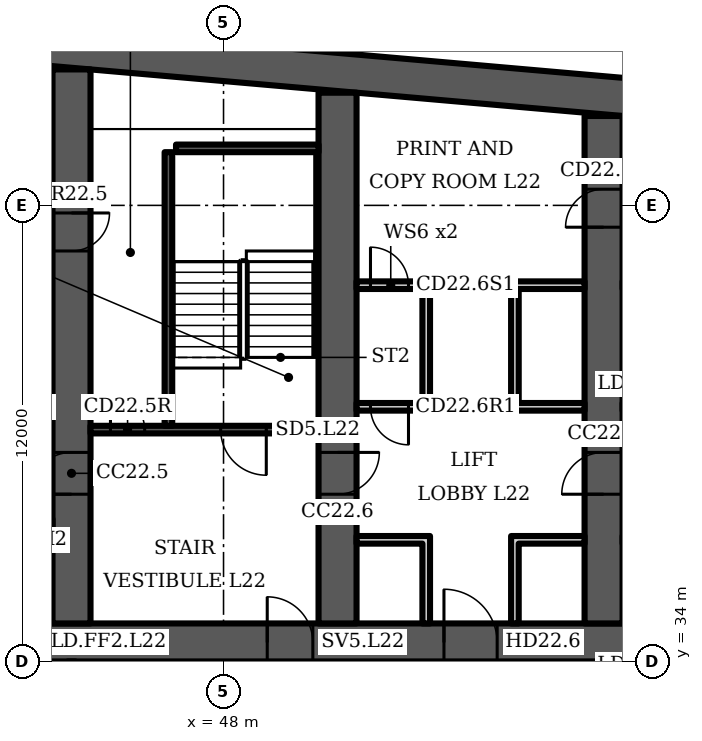
"""IFC4 building model, lengths in metres.
Left out: names, types, materials, properties, quantities, classifications, styles, units other than length and angle.
Written with IfcOpenShell. Run it as: python <this file> out.ifc"""

import sys

from ifc_helpers import new_model, si_unit, direction, frame, frame_2d, origin, place, context, subcontext, project, spatial, polyline, rectangle, outline, extrude, element, fill, save


model = new_model("IFC4")
c1 = context("Model", 3, precision=1e-05, world=origin(), true_north=direction((0.0, 1.0)))
c2 = subcontext(c1, "Body", "Model", "MODEL_VIEW")
j1 = project(units=[si_unit("LENGTHUNIT", "METRE"), si_unit("PLANEANGLEUNIT", "RADIAN")], contexts=[c1])
p1 = place(None, origin())
s1 = spatial("IfcSite", under=j1, at=p1, CompositionType="ELEMENT")
p2 = place(p1, origin())
s2 = spatial("IfcBuilding", under=s1, at=p2, CompositionType="ELEMENT")
p3 = place(p2, frame((0.0, 0.0, 100.3)))
s3 = spatial("IfcBuildingStorey", under=s2, at=p3, CompositionType="ELEMENT", Elevation=100.3)
p4 = place(p3, frame((0.0, 0.0, -0.0)))
e1 = element("IfcWall", 1, at=p4, inside=s3, PredefinedType="SHEAR", context=c2, shape_type="SweptSolid", body=[
    extrude(outline(polyline([(16.0, 47.784), (40.5, 49.927), (65.0, 47.784), (65.0, 48.787), (40.5, 50.931), (16.0, 48.787), (16.0, 47.784)])), origin(), (0.0, 0.0, 1.0), 3.6),
])
p5 = place(p3, frame((16.0, 34.5, 0.0), z_axis=(0.0, 0.0, 1.0), x_axis=(1.0, 0.0, 0.0)))
e2 = element("IfcWall", 2, at=p5, inside=s3, PredefinedType="SHEAR", context=c2, shape_type="SweptSolid", body=[
    extrude(rectangle(XDim=49.0, YDim=1.0, at=frame_2d((24.5, 0.0))), origin(), (0.0, 0.0, 1.0), 3.6),
])
p6 = place(p5, frame((1.2, 0.0, 0.0)))
e3 = element("IfcOpeningElement", 3, at=p6, cuts=e2, PredefinedType="OPENING", context=c2, shape_type="SweptSolid", body=[
    extrude(rectangle(XDim=1.1, YDim=2.1, at=frame_2d((0.55, 1.05))), frame((0.0, 0.51, 0.0), z_axis=(0.0, -1.0, 0.0), x_axis=(1.0, 0.0, 0.0)), (0.0, 0.0, 1.0), 1.02),
])
p7 = place(p5, frame((5.083, 0.0, 0.0)))
e4 = element("IfcOpeningElement", 4, at=p7, cuts=e2, PredefinedType="OPENING", context=c2, shape_type="SweptSolid", body=[
    extrude(rectangle(XDim=1.1, YDim=2.1, at=frame_2d((0.55, 1.05))), frame((0.0, 0.51, 0.0), z_axis=(0.0, -1.0, 0.0), x_axis=(1.0, 0.0, 0.0)), (0.0, 0.0, 1.0), 1.02),
])
p8 = place(p5, frame((2.933, 0.0, 0.0)))
e5 = element("IfcOpeningElement", 5, at=p8, cuts=e2, PredefinedType="OPENING", context=c2, shape_type="SweptSolid", body=[
    extrude(rectangle(XDim=1.4, YDim=2.1, at=frame_2d((0.7, 1.05))), frame((0.0, 0.51, 0.0), z_axis=(0.0, -1.0, 0.0), x_axis=(1.0, 0.0, 0.0)), (0.0, 0.0, 1.0), 1.02),
])
p9 = place(p5, frame((7.65, 0.0, 0.0)))
e6 = element("IfcOpeningElement", 6, at=p9, cuts=e2, PredefinedType="OPENING", context=c2, shape_type="SweptSolid", body=[
    extrude(rectangle(XDim=1.2, YDim=2.1, at=frame_2d((0.6, 1.05))), frame((0.0, 0.51, 0.0), z_axis=(0.0, -1.0, 0.0), x_axis=(1.0, 0.0, 0.0)), (0.0, 0.0, 1.0), 1.02),
])
p10 = place(p5, frame((14.817, 0.0, 0.0)))
e7 = element("IfcOpeningElement", 7, at=p10, cuts=e2, PredefinedType="OPENING", context=c2, shape_type="SweptSolid", body=[
    extrude(rectangle(XDim=1.1, YDim=2.1, at=frame_2d((0.55, 1.05))), frame((0.0, 0.51, 0.0), z_axis=(0.0, -1.0, 0.0), x_axis=(1.0, 0.0, 0.0)), (0.0, 0.0, 1.0), 1.02),
])
p11 = place(p5, frame((19.083, 0.0, 0.0)))
e8 = element("IfcOpeningElement", 8, at=p11, cuts=e2, PredefinedType="OPENING", context=c2, shape_type="SweptSolid", body=[
    extrude(rectangle(XDim=1.1, YDim=2.1, at=frame_2d((0.55, 1.05))), frame((0.0, 0.51, 0.0), z_axis=(0.0, -1.0, 0.0), x_axis=(1.0, 0.0, 0.0)), (0.0, 0.0, 1.0), 1.02),
])
p12 = place(p5, frame((16.8, 0.0, 0.0)))
e9 = element("IfcOpeningElement", 9, at=p12, cuts=e2, PredefinedType="OPENING", context=c2, shape_type="SweptSolid", body=[
    extrude(rectangle(XDim=1.4, YDim=2.1, at=frame_2d((0.7, 1.05))), frame((0.0, 0.51, 0.0), z_axis=(0.0, -1.0, 0.0), x_axis=(1.0, 0.0, 0.0)), (0.0, 0.0, 1.0), 1.02),
])
p13 = place(p5, frame((21.817, 0.0, 0.0)))
e10 = element("IfcOpeningElement", 10, at=p13, cuts=e2, PredefinedType="OPENING", context=c2, shape_type="SweptSolid", body=[
    extrude(rectangle(XDim=1.1, YDim=2.1, at=frame_2d((0.55, 1.05))), frame((0.0, 0.51, 0.0), z_axis=(0.0, -1.0, 0.0), x_axis=(1.0, 0.0, 0.0)), (0.0, 0.0, 1.0), 1.02),
])
p14 = place(p5, frame((26.083, 0.0, 0.0)))
e11 = element("IfcOpeningElement", 11, at=p14, cuts=e2, PredefinedType="OPENING", context=c2, shape_type="SweptSolid", body=[
    extrude(rectangle(XDim=1.1, YDim=2.1, at=frame_2d((0.55, 1.05))), frame((0.0, 0.51, 0.0), z_axis=(0.0, -1.0, 0.0), x_axis=(1.0, 0.0, 0.0)), (0.0, 0.0, 1.0), 1.02),
])
p15 = place(p5, frame((33.15, 0.0, 0.0)))
e12 = element("IfcOpeningElement", 12, at=p15, cuts=e2, PredefinedType="OPENING", context=c2, shape_type="SweptSolid", body=[
    extrude(rectangle(XDim=1.2, YDim=2.1, at=frame_2d((0.6, 1.05))), frame((0.0, 0.51, 0.0), z_axis=(0.0, -1.0, 0.0), x_axis=(1.0, 0.0, 0.0)), (0.0, 0.0, 1.0), 1.02),
])
p16 = place(p5, frame((37.8, 0.0, 0.0)))
e13 = element("IfcOpeningElement", 13, at=p16, cuts=e2, PredefinedType="OPENING", context=c2, shape_type="SweptSolid", body=[
    extrude(rectangle(XDim=1.4, YDim=2.1, at=frame_2d((0.7, 1.05))), frame((0.0, 0.51, 0.0), z_axis=(0.0, -1.0, 0.0), x_axis=(1.0, 0.0, 0.0)), (0.0, 0.0, 1.0), 1.02),
])
p17 = place(p5, frame((42.817, 0.0, 0.0)))
e14 = element("IfcOpeningElement", 14, at=p17, cuts=e2, PredefinedType="OPENING", context=c2, shape_type="SweptSolid", body=[
    extrude(rectangle(XDim=1.1, YDim=2.1, at=frame_2d((0.55, 1.05))), frame((0.0, 0.51, 0.0), z_axis=(0.0, -1.0, 0.0), x_axis=(1.0, 0.0, 0.0)), (0.0, 0.0, 1.0), 1.02),
])
p18 = place(p5, frame((46.7, 0.0, 0.0)))
e15 = element("IfcOpeningElement", 15, at=p18, cuts=e2, PredefinedType="OPENING", context=c2, shape_type="SweptSolid", body=[
    extrude(rectangle(XDim=1.1, YDim=2.1, at=frame_2d((0.55, 1.05))), frame((0.0, 0.51, 0.0), z_axis=(0.0, -1.0, 0.0), x_axis=(1.0, 0.0, 0.0)), (0.0, 0.0, 1.0), 1.02),
])
p19 = place(p5, frame((44.667, 0.0, 0.0)))
e16 = element("IfcOpeningElement", 16, at=p19, cuts=e2, PredefinedType="OPENING", context=c2, shape_type="SweptSolid", body=[
    extrude(rectangle(XDim=1.4, YDim=2.1, at=frame_2d((0.7, 1.05))), frame((0.0, 0.51, 0.0), z_axis=(0.0, -1.0, 0.0), x_axis=(1.0, 0.0, 0.0)), (0.0, 0.0, 1.0), 1.02),
])
p20 = place(p3, frame((44.0, 35.0, 0.0), z_axis=(0.0, 0.0, 1.0), x_axis=(0.0, 1.0, 0.0)))
e17 = element("IfcWall", 17, at=p20, inside=s3, PredefinedType="SHEAR", context=c2, shape_type="SweptSolid", body=[
    extrude(rectangle(XDim=14.577, YDim=1.0, at=frame_2d((7.289, 0.0))), origin(), (0.0, 0.0, 1.0), 3.6),
])
p21 = place(p20, frame((3.4, 0.0, 0.0)))
e18 = element("IfcOpeningElement", 18, at=p21, cuts=e17, PredefinedType="OPENING", context=c2, shape_type="SweptSolid", body=[
    extrude(rectangle(XDim=1.1, YDim=2.1, at=frame_2d((0.55, 1.05))), frame((0.0, 0.51, 0.0), z_axis=(0.0, -1.0, 0.0), x_axis=(1.0, 0.0, 0.0)), (0.0, 0.0, 1.0), 1.02),
])
p22 = place(p20, frame((9.8, 0.0, 0.0)))
e19 = element("IfcOpeningElement", 19, at=p22, cuts=e17, PredefinedType="OPENING", context=c2, shape_type="SweptSolid", body=[
    extrude(rectangle(XDim=1.0, YDim=2.1, at=frame_2d((0.5, 1.05))), frame((0.0, 0.51, 0.0), z_axis=(0.0, -1.0, 0.0), x_axis=(1.0, 0.0, 0.0)), (0.0, 0.0, 1.0), 1.02),
])
p23 = place(p3, frame((51.0, 35.0, 0.0), z_axis=(0.0, 0.0, 1.0), x_axis=(0.0, 1.0, 0.0)))
e20 = element("IfcWall", 20, at=p23, inside=s3, PredefinedType="SHEAR", context=c2, shape_type="SweptSolid", body=[
    extrude(rectangle(XDim=13.965, YDim=1.0, at=frame_2d((6.982, 0.0))), origin(), (0.0, 0.0, 1.0), 3.6),
])
p24 = place(p23, frame((3.4, 0.0, 0.0)))
e21 = element("IfcOpeningElement", 21, at=p24, cuts=e20, PredefinedType="OPENING", context=c2, shape_type="SweptSolid", body=[
    extrude(rectangle(XDim=1.1, YDim=2.1, at=frame_2d((0.55, 1.05))), frame((0.0, 0.51, 0.0), z_axis=(0.0, -1.0, 0.0), x_axis=(1.0, 0.0, 0.0)), (0.0, 0.0, 1.0), 1.02),
])
p25 = place(p3, frame((58.0, 35.0, 0.0), z_axis=(0.0, 0.0, 1.0), x_axis=(0.0, 1.0, 0.0)))
e22 = element("IfcWall", 22, at=p25, inside=s3, PredefinedType="SHEAR", context=c2, shape_type="SweptSolid", body=[
    extrude(rectangle(XDim=13.352, YDim=1.0, at=frame_2d((6.676, 0.0))), origin(), (0.0, 0.0, 1.0), 3.6),
])
p26 = place(p25, frame((10.426, 0.0, 0.0)))
e23 = element("IfcOpeningElement", 23, at=p26, cuts=e22, PredefinedType="OPENING", context=c2, shape_type="SweptSolid", body=[
    extrude(rectangle(XDim=1.0, YDim=2.1, at=frame_2d((0.5, 1.05))), frame((0.0, 0.51, 0.0), z_axis=(0.0, -1.0, 0.0), x_axis=(1.0, 0.0, 0.0)), (0.0, 0.0, 1.0), 1.02),
])
p27 = place(p25, frame((3.4, 0.0, 0.0)))
e24 = element("IfcOpeningElement", 24, at=p27, cuts=e22, PredefinedType="OPENING", context=c2, shape_type="SweptSolid", body=[
    extrude(rectangle(XDim=1.1, YDim=2.1, at=frame_2d((0.55, 1.05))), frame((0.0, 0.51, 0.0), z_axis=(0.0, -1.0, 0.0), x_axis=(1.0, 0.0, 0.0)), (0.0, 0.0, 1.0), 1.02),
])
p28 = place(p3, frame((44.5, 40.1, 0.0), z_axis=(0.0, 0.0, 1.0), x_axis=(1.0, 0.0, 0.0)))
e25 = element("IfcWall", 25, at=p28, inside=s3, PredefinedType="SHEAR", context=c2, shape_type="SweptSolid", body=[
    extrude(rectangle(XDim=6.0, YDim=0.2, at=frame_2d((3.0, 0.0))), origin(), (0.0, 0.0, 1.0), 3.2),
])
p29 = place(p28, frame((3.425, 0.0, 0.0)))
e26 = element("IfcOpeningElement", 26, at=p29, cuts=e25, PredefinedType="OPENING", context=c2, shape_type="SweptSolid", body=[
    extrude(rectangle(XDim=1.2, YDim=2.1, at=frame_2d((0.6, 1.05))), frame((0.0, 0.11, 0.0), z_axis=(0.0, -1.0, 0.0), x_axis=(1.0, 0.0, 0.0)), (0.0, 0.0, 1.0), 0.22),
])
p30 = place(p28, frame((0.525, 0.0, 0.0)))
e27 = element("IfcOpeningElement", 27, at=p30, cuts=e25, PredefinedType="OPENING", context=c2, shape_type="SweptSolid", body=[
    extrude(rectangle(XDim=0.9, YDim=2.1, at=frame_2d((0.45, 1.05))), frame((0.0, 0.11, 0.0), z_axis=(0.0, -1.0, 0.0), x_axis=(1.0, 0.0, 0.0)), (0.0, 0.0, 1.0), 0.22),
])
p31 = place(p3, frame((46.55, 40.2, 0.0), z_axis=(0.0, 0.0, 1.0), x_axis=(0.0, 1.0, 0.0)))
e28 = element("IfcWall", 28, at=p31, inside=s3, PredefinedType="SHEAR", context=c2, shape_type="SweptSolid", body=[
    extrude(rectangle(XDim=7.2, YDim=0.2, at=frame_2d((3.6, 0.0))), origin(), (0.0, 0.0, 1.0), 3.2),
])
p32 = place(p3, frame((46.75, 47.5, 0.0), z_axis=(0.0, 0.0, 1.0), x_axis=(1.0, 0.0, 0.0)))
e29 = element("IfcWall", 29, at=p32, inside=s3, PredefinedType="SHEAR", context=c2, shape_type="SweptSolid", body=[
    extrude(rectangle(XDim=3.75, YDim=0.2, at=frame_2d((1.875, 0.0))), origin(), (0.0, 0.0, 1.0), 3.2),
])
p33 = place(p3, frame((51.5, 40.7, 0.0), z_axis=(0.0, 0.0, 1.0), x_axis=(1.0, 0.0, 0.0)))
e30 = element("IfcWall", 30, at=p33, inside=s3, PredefinedType="PARTITIONING", context=c2, shape_type="SweptSolid", body=[
    extrude(rectangle(XDim=6.0, YDim=0.2, at=frame_2d((3.0, 0.0))), origin(), (0.0, 0.0, 1.0), 3.2),
])
p34 = place(p33, frame((0.367, 0.0, 0.0)))
e31 = element("IfcOpeningElement", 31, at=p34, cuts=e30, PredefinedType="OPENING", context=c2, shape_type="SweptSolid", body=[
    extrude(rectangle(XDim=1.0, YDim=2.1, at=frame_2d((0.5, 1.05))), frame((0.0, 0.11, 0.0), z_axis=(0.0, -1.0, 0.0), x_axis=(1.0, 0.0, 0.0)), (0.0, 0.0, 1.0), 0.22),
])
p35 = place(p3, frame((51.5, 43.9, 0.0), z_axis=(0.0, 0.0, 1.0), x_axis=(1.0, 0.0, 0.0)))
e32 = element("IfcWall", 32, at=p35, inside=s3, PredefinedType="PARTITIONING", context=c2, shape_type="SweptSolid", body=[
    extrude(rectangle(XDim=6.0, YDim=0.2, at=frame_2d((3.0, 0.0))), origin(), (0.0, 0.0, 1.0), 3.2),
])
p36 = place(p35, frame((0.367, 0.0, 0.0)))
e33 = element("IfcOpeningElement", 33, at=p36, cuts=e32, PredefinedType="OPENING", context=c2, shape_type="SweptSolid", body=[
    extrude(rectangle(XDim=1.0, YDim=2.1, at=frame_2d((0.5, 1.05))), frame((0.0, 0.11, 0.0), z_axis=(0.0, -1.0, 0.0), x_axis=(1.0, 0.0, 0.0)), (0.0, 0.0, 1.0), 0.22),
])
p37 = place(p3, frame((0.0, 0.0, -0.0)))
e34 = element("IfcWall", 34, at=p37, inside=s3, PredefinedType="PARTITIONING", context=c2, shape_type="SweptSolid", body=[
    extrude(outline(polyline([(53.233, 37.1), (51.5, 37.1), (51.5, 37.3), (53.233, 37.3), (53.433, 37.3), (53.433, 35.0), (53.233, 35.0), (53.233, 37.1)])), origin(), (0.0, 0.0, 1.0), 3.2),
])
p38 = place(p3, frame((0.0, 0.0, -0.0)))
e35 = element("IfcWall", 35, at=p38, inside=s3, PredefinedType="PARTITIONING", context=c2, shape_type="SweptSolid", body=[
    extrude(outline(polyline([(55.567, 37.3), (55.767, 37.3), (57.5, 37.3), (57.5, 37.1), (55.767, 37.1), (55.767, 35.0), (55.567, 35.0), (55.567, 37.3)])), origin(), (0.0, 0.0, 1.0), 3.2),
])
p39 = place(p3, frame((0.0, 0.0, -0.0)))
e36 = element("IfcWall", 36, at=p39, inside=s3, PredefinedType="PARTITIONING", context=c2, shape_type="SweptSolid", body=[
    extrude(outline(polyline([(53.233, 40.8), (53.233, 43.8), (53.433, 43.8), (53.433, 40.8), (53.233, 40.8)])), origin(), (0.0, 0.0, 1.0), 3.2),
])
p40 = place(p3, frame((0.0, 0.0, -0.0)))
e37 = element("IfcWall", 37, at=p40, inside=s3, PredefinedType="PARTITIONING", context=c2, shape_type="SweptSolid", body=[
    extrude(outline(polyline([(55.567, 40.8), (55.567, 43.8), (55.767, 43.8), (55.767, 40.8), (55.567, 40.8)])), origin(), (0.0, 0.0, 1.0), 3.2),
])
p41 = place(p29, origin())
e38 = element("IfcDoor", 38, at=p41, inside=s3, OperationType="SINGLE_SWING_RIGHT", PredefinedType="DOOR", context=c2, shape_type="SweptSolid", body=[
    extrude(rectangle(XDim=1.2, YDim=2.1, at=frame_2d((0.6, 1.05))), frame((0.0, 0.025, 0.0), z_axis=(0.0, -1.0, 0.0), x_axis=(1.0, 0.0, 0.0)), (0.0, 0.0, 1.0), 0.05),
])
fill(e26, e38)
p42 = place(p30, origin())
e39 = element("IfcDoor", 39, at=p42, inside=s3, OperationType="SINGLE_SWING_LEFT", PredefinedType="DOOR", context=c2, shape_type="SweptSolid", body=[
    extrude(rectangle(XDim=0.9, YDim=2.1, at=frame_2d((0.45, 1.05))), frame((0.0, 0.025, 0.0), z_axis=(0.0, -1.0, 0.0), x_axis=(1.0, 0.0, 0.0)), (0.0, 0.0, 1.0), 0.05),
])
fill(e27, e39)
p43 = place(p15, origin())
e40 = element("IfcDoor", 40, at=p43, inside=s3, OperationType="SINGLE_SWING_LEFT", PredefinedType="DOOR", context=c2, shape_type="SweptSolid", body=[
    extrude(rectangle(XDim=1.2, YDim=2.1, at=frame_2d((0.6, 1.05))), frame((0.0, 0.025, 0.0), z_axis=(0.0, -1.0, 0.0), x_axis=(1.0, 0.0, 0.0)), (0.0, 0.0, 1.0), 0.05),
])
fill(e12, e40)
p44 = place(p16, origin())
e41 = element("IfcDoor", 41, at=p44, inside=s3, OperationType="DOUBLE_DOOR_SINGLE_SWING", PredefinedType="DOOR", context=c2, shape_type="SweptSolid", body=[
    extrude(rectangle(XDim=1.4, YDim=2.1, at=frame_2d((0.7, 1.05))), frame((0.0, 0.025, 0.0), z_axis=(0.0, -1.0, 0.0), x_axis=(1.0, 0.0, 0.0)), (0.0, 0.0, 1.0), 0.05),
])
fill(e13, e41)
p45 = place(p34, origin())
e42 = element("IfcDoor", 42, at=p45, inside=s3, OperationType="SINGLE_SWING_RIGHT", PredefinedType="DOOR", context=c2, shape_type="SweptSolid", body=[
    extrude(rectangle(XDim=1.0, YDim=2.1, at=frame_2d((0.5, 1.05))), frame((0.0, 0.025, 0.0), z_axis=(0.0, -1.0, 0.0), x_axis=(1.0, 0.0, 0.0)), (0.0, 0.0, 1.0), 0.05),
])
fill(e31, e42)
p46 = place(p36, origin())
e43 = element("IfcDoor", 43, at=p46, inside=s3, OperationType="SINGLE_SWING_LEFT", PredefinedType="DOOR", context=c2, shape_type="SweptSolid", body=[
    extrude(rectangle(XDim=1.0, YDim=2.1, at=frame_2d((0.5, 1.05))), frame((0.0, 0.025, 0.0), z_axis=(0.0, -1.0, 0.0), x_axis=(1.0, 0.0, 0.0)), (0.0, 0.0, 1.0), 0.05),
])
fill(e33, e43)
p47 = place(p26, origin())
e44 = element("IfcDoor", 44, at=p47, inside=s3, OperationType="SINGLE_SWING_LEFT", PredefinedType="DOOR", context=c2, shape_type="SweptSolid", body=[
    extrude(rectangle(XDim=1.0, YDim=2.1, at=frame_2d((0.5, 1.05))), frame((0.0, 0.5, 0.0), z_axis=(0.0, -1.0, 0.0), x_axis=(1.0, 0.0, 0.0)), (0.0, 0.0, 1.0), 1.0),
])
fill(e23, e44)
p48 = place(p21, origin())
e45 = element("IfcDoor", 45, at=p48, inside=s3, OperationType="SINGLE_SWING_LEFT", PredefinedType="DOOR", context=c2, shape_type="SweptSolid", body=[
    extrude(rectangle(XDim=1.1, YDim=2.1, at=frame_2d((0.55, 1.05))), frame((0.0, 0.025, 0.0), z_axis=(0.0, -1.0, 0.0), x_axis=(1.0, 0.0, 0.0)), (0.0, 0.0, 1.0), 0.05),
])
fill(e18, e45)
p49 = place(p22, origin())
e46 = element("IfcDoor", 46, at=p49, inside=s3, OperationType="SINGLE_SWING_RIGHT", PredefinedType="DOOR", context=c2, shape_type="SweptSolid", body=[
    extrude(rectangle(XDim=1.0, YDim=2.1, at=frame_2d((0.5, 1.05))), frame((0.0, 0.5, 0.0), z_axis=(0.0, -1.0, 0.0), x_axis=(1.0, 0.0, 0.0)), (0.0, 0.0, 1.0), 1.0),
])
fill(e19, e46)
p50 = place(p24, origin())
e47 = element("IfcDoor", 47, at=p50, inside=s3, OperationType="SINGLE_SWING_RIGHT", PredefinedType="DOOR", context=c2, shape_type="SweptSolid", body=[
    extrude(rectangle(XDim=1.1, YDim=2.1, at=frame_2d((0.55, 1.05))), frame((0.0, 0.025, 0.0), z_axis=(0.0, -1.0, 0.0), x_axis=(1.0, 0.0, 0.0)), (0.0, 0.0, 1.0), 0.05),
])
fill(e21, e47)
p51 = place(p27, origin())
e48 = element("IfcDoor", 48, at=p51, inside=s3, OperationType="SINGLE_SWING_LEFT", PredefinedType="DOOR", context=c2, shape_type="SweptSolid", body=[
    extrude(rectangle(XDim=1.1, YDim=2.1, at=frame_2d((0.55, 1.05))), frame((0.0, 0.025, 0.0), z_axis=(0.0, -1.0, 0.0), x_axis=(1.0, 0.0, 0.0)), (0.0, 0.0, 1.0), 0.05),
])
fill(e24, e48)
save(model, sys.argv[1])
